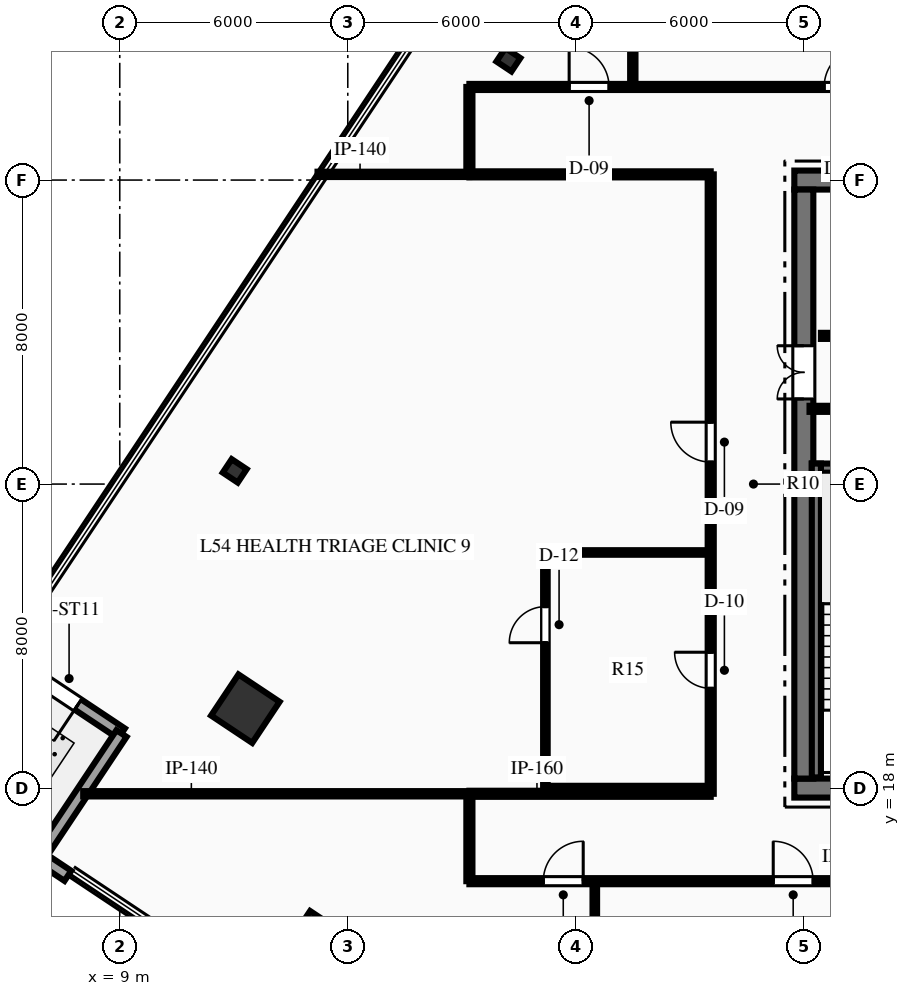
"""IFC4 building model, lengths in metres.
Left out: names, types, materials, properties, quantities, classifications, styles, units other than length and angle.
Written with IfcOpenShell. Run it as: python <this file> out.ifc"""

import sys

from ifc_helpers import new_model, si_unit, direction, frame, frame_2d, origin, origin_2d, place, context, subcontext, project, spatial, rectangle, hollow_rectangle, i_section, extrude, element, fill, save


model = new_model("IFC4")
c1 = context("Model", 3, precision=1e-05, world=origin(), true_north=direction((0.0, 1.0)))
c2 = subcontext(c1, "Body", "Model", "MODEL_VIEW")
j1 = project(units=[si_unit("LENGTHUNIT", "METRE"), si_unit("PLANEANGLEUNIT", "RADIAN")], contexts=[c1])
p1 = place(None, origin())
s1 = spatial("IfcSite", under=j1, at=p1, CompositionType="ELEMENT")
p2 = place(p1, origin())
s2 = spatial("IfcBuilding", under=s1, at=p2, CompositionType="ELEMENT")
p3 = place(p2, frame((0.0, 0.0, 217.2)))
s3 = spatial("IfcBuildingStorey", under=s2, at=p3, CompositionType="ELEMENT", Elevation=217.2)
p4 = place(p3, frame((26.75, 18.0, 0.0), z_axis=(0.0, 0.0, 1.0), x_axis=(1.0, 0.0, 0.0)))
e1 = element("IfcWall", 1, at=p4, inside=s3, PredefinedType="SHEAR", context=c2, shape_type="SweptSolid", body=[
    extrude(rectangle(XDim=18.5, YDim=0.5, at=frame_2d((9.25, 0.0))), origin(), (0.0, 0.0, 1.0), 3.75),
])
p5 = place(p4, frame((7.35, 0.0, 0.0)))
e2 = element("IfcOpeningElement", 2, at=p5, cuts=e1, PredefinedType="OPENING", context=c2, shape_type="SweptSolid", body=[
    extrude(rectangle(XDim=1.1, YDim=2.15, at=frame_2d((0.55, 1.075))), frame((0.0, 0.26, 0.0), z_axis=(0.0, -1.0, 0.0), x_axis=(1.0, 0.0, 0.0)), (0.0, 0.0, 1.0), 0.52),
])
p6 = place(p4, frame((10.05, 0.0, 0.0)))
e3 = element("IfcOpeningElement", 3, at=p6, cuts=e1, PredefinedType="OPENING", context=c2, shape_type="SweptSolid", body=[
    extrude(rectangle(XDim=1.1, YDim=2.15, at=frame_2d((0.55, 1.075))), frame((0.0, 0.26, 0.0), z_axis=(0.0, -1.0, 0.0), x_axis=(1.0, 0.0, 0.0)), (0.0, 0.0, 1.0), 0.52),
])
p7 = place(p3, frame((26.75, 34.0, 0.0), z_axis=(0.0, 0.0, 1.0), x_axis=(1.0, 0.0, 0.0)))
e4 = element("IfcWall", 4, at=p7, inside=s3, PredefinedType="SHEAR", context=c2, shape_type="SweptSolid", body=[
    extrude(rectangle(XDim=18.5, YDim=0.5, at=frame_2d((9.25, 0.0))), origin(), (0.0, 0.0, 1.0), 3.75),
])
p8 = place(p7, frame((13.935, 0.0, 0.0)))
e5 = element("IfcOpeningElement", 5, at=p8, cuts=e4, PredefinedType="OPENING", context=c2, shape_type="SweptSolid", body=[
    extrude(rectangle(XDim=1.1, YDim=2.15, at=frame_2d((0.55, 1.075))), frame((0.0, 0.26, 0.0), z_axis=(0.0, -1.0, 0.0), x_axis=(1.0, 0.0, 0.0)), (0.0, 0.0, 1.0), 0.52),
])
p9 = place(p7, frame((16.185, 0.0, 0.0)))
e6 = element("IfcOpeningElement", 6, at=p9, cuts=e4, PredefinedType="OPENING", context=c2, shape_type="SweptSolid", body=[
    extrude(rectangle(XDim=1.1, YDim=2.15, at=frame_2d((0.55, 1.075))), frame((0.0, 0.26, 0.0), z_axis=(0.0, -1.0, 0.0), x_axis=(1.0, 0.0, 0.0)), (0.0, 0.0, 1.0), 0.52),
])
p10 = place(p3, frame((27.0, 18.25, 0.0), z_axis=(0.0, 0.0, 1.0), x_axis=(0.0, 1.0, 0.0)))
e7 = element("IfcWall", 7, at=p10, inside=s3, PredefinedType="SHEAR", context=c2, shape_type="SweptSolid", body=[
    extrude(rectangle(XDim=15.5, YDim=0.5, at=frame_2d((7.75, 0.0))), origin(), (0.0, 0.0, 1.0), 3.75),
])
p11 = place(p10, frame((9.99, 0.0, 0.0)))
e8 = element("IfcOpeningElement", 8, at=p11, cuts=e7, PredefinedType="OPENING", context=c2, shape_type="SweptSolid", body=[
    extrude(rectangle(XDim=1.4, YDim=2.2, at=frame_2d((0.7, 1.1))), frame((0.0, 0.26, 0.0), z_axis=(0.0, -1.0, 0.0), x_axis=(1.0, 0.0, 0.0)), (0.0, 0.0, 1.0), 0.52),
])
p12 = place(p3, frame((27.21, 26.42, 0.0), z_axis=(0.0, 0.0, 1.0), x_axis=(1.0, 0.0, 0.0)))
e9 = element("IfcWall", 9, at=p12, inside=s3, PredefinedType="SHEAR", context=c2, shape_type="SweptSolid", body=[
    extrude(rectangle(XDim=3.98, YDim=0.24, at=frame_2d((1.99, 0.0))), origin(), (0.0, 0.0, 1.0), 3.75),
])
p13 = place(p3, frame((27.33, 18.28, 0.0), z_axis=(0.0, 0.0, 1.0), x_axis=(0.0, 1.0, 0.0)))
e10 = element("IfcWall", 10, at=p13, inside=s3, PredefinedType="SHEAR", context=c2, shape_type="SweptSolid", body=[
    extrude(rectangle(XDim=8.26, YDim=0.24, at=frame_2d((4.13, 0.0))), origin(), (0.0, 0.0, 1.0), 3.75),
])
p14 = place(p3, frame((12.305, 20.09, 0.0), z_axis=(0.0, 0.0, 1.0), x_axis=(0.554118199338, 0.832437998389, 0.0)))
e11 = element("IfcColumn", 11, at=p14, inside=s3, PredefinedType="COLUMN", context=c2, shape_type="SweptSolid", body=[
    extrude(hollow_rectangle(XDim=1.3, YDim=1.3, WallThickness=0.06, at=origin_2d()), origin(), (0.0, 0.0, 1.0), 3.75),
])
for number, where, z_axis, x_axis in (
    (12, (19.226, 37.166, 0.0), (0.0, 0.0, 1.0), (0.554, 0.832, 0.0)),
    (13, (12.025, 26.347, 0.0), (0.0, 0.0, 1.0), (0.554, 0.832, 0.0)),
    (14, (14.088, 14.458, 0.0), (0.0, 0.0, 1.0), (0.554, 0.832, 0.0)),
):
    element("IfcColumn", number, at=place(p3, frame(where, z_axis=z_axis, x_axis=x_axis)), inside=s3, PredefinedType="COLUMN", context=c2, shape_type="SweptSolid", body=[
        extrude(i_section(OverallWidth=0.424, OverallDepth=0.474, WebThickness=0.048, FlangeThickness=0.077, at=origin_2d()), origin(), (0.0, 0.0, 1.0), 3.75),
    ])
p15 = place(p3, frame((9.046, 19.436, 0.0), z_axis=(0.0, 0.0, 1.0), x_axis=(-0.832464190202, 0.554078850013, 0.0)))
e15 = element("IfcWall", 15, at=p15, inside=s3, PredefinedType="STANDARD", context=c2, shape_type="SweptSolid", body=[
    extrude(rectangle(XDim=3.9, YDim=0.32, at=frame_2d((1.95, 0.0))), origin(), (0.0, 0.0, 1.0), 3.47),
])
p16 = place(p15, frame((1.375, 0.0, 0.0)))
e16 = element("IfcOpeningElement", 16, at=p16, cuts=e15, PredefinedType="OPENING", context=c2, shape_type="SweptSolid", body=[
    extrude(rectangle(XDim=1.15, YDim=2.2, at=frame_2d((0.575, 1.1))), frame((0.0, 0.17, 0.0), z_axis=(0.0, -1.0, 0.0), x_axis=(1.0, 0.0, 0.0)), (0.0, 0.0, 1.0), 0.34),
])
p17 = place(p3, frame((6.885, 16.189, 0.0), z_axis=(0.0, 0.0, 1.0), x_axis=(0.554122229834, 0.832435315447, 0.0)))
e17 = element("IfcWall", 17, at=p17, inside=s3, PredefinedType="STANDARD", context=c2, shape_type="SweptSolid", body=[
    extrude(rectangle(XDim=3.9, YDim=0.32, at=frame_2d((1.95, 0.0))), origin(), (0.0, 0.0, 1.0), 3.47),
])
p18 = place(p3, frame((7.634, 15.69, 0.0), z_axis=(0.0, 0.0, 1.0), x_axis=(-0.832425662246, 0.554136731172, 0.0)))
e18 = element("IfcWall", 18, at=p18, inside=s3, PredefinedType="STANDARD", context=c2, shape_type="SweptSolid", body=[
    extrude(rectangle(XDim=0.9, YDim=0.32, at=frame_2d((0.45, 0.0))), origin(), (0.0, 0.0, 1.0), 3.47),
])
p19 = place(p3, frame((27.15, 27.98, 0.0), z_axis=(0.0, 0.0, 1.0), x_axis=(1.0, 0.0, 0.0)))
e19 = element("IfcWall", 19, at=p19, inside=s3, PredefinedType="PARTITIONING", context=c2, shape_type="SweptSolid", body=[
    extrude(rectangle(XDim=4.05, YDim=0.16, at=frame_2d((2.025, 0.0))), origin(), (0.0, 0.0, 1.0), 3.47),
])
p20 = place(p19, frame((1.625, 0.0, 0.0)))
e20 = element("IfcOpeningElement", 20, at=p20, cuts=e19, PredefinedType="OPENING", context=c2, shape_type="SweptSolid", body=[
    extrude(rectangle(XDim=0.95, YDim=2.15, at=frame_2d((0.475, 1.075))), frame((0.0, 0.09, 0.0), z_axis=(0.0, -1.0, 0.0), x_axis=(1.0, 0.0, 0.0)), (0.0, 0.0, 1.0), 0.18),
])
p21 = place(p3, frame((27.45, 29.9, 0.0), z_axis=(0.0, 0.0, 1.0), x_axis=(1.0, 0.0, 0.0)))
e21 = element("IfcWall", 21, at=p21, inside=s3, PredefinedType="PARTITIONING", context=c2, shape_type="SweptSolid", body=[
    extrude(rectangle(XDim=4.43, YDim=0.16, at=frame_2d((2.215, 0.0))), origin(), (0.0, 0.0, 1.0), 3.47),
])
p22 = place(p21, frame((1.675, 0.0, 0.0)))
e22 = element("IfcOpeningElement", 22, at=p22, cuts=e21, PredefinedType="OPENING", context=c2, shape_type="SweptSolid", body=[
    extrude(rectangle(XDim=0.95, YDim=2.15, at=frame_2d((0.475, 1.075))), frame((0.0, 0.09, 0.0), z_axis=(0.0, -1.0, 0.0), x_axis=(1.0, 0.0, 0.0)), (0.0, 0.0, 1.0), 0.18),
])
p23 = place(p3, frame((18.2, 15.55, 0.0), z_axis=(0.0, 0.0, 1.0), x_axis=(1.0, 0.0, 0.0)))
e23 = element("IfcWall", 23, at=p23, inside=s3, PredefinedType="PARTITIONING", context=c2, shape_type="SweptSolid", body=[
    extrude(rectangle(XDim=35.6, YDim=0.16, at=frame_2d((17.8, 0.0))), origin(), (0.0, 0.0, 1.0), 2.849),
])
p24 = place(p23, frame((22.45, 0.0, 0.0)))
e24 = element("IfcOpeningElement", 24, at=p24, cuts=e23, PredefinedType="OPENING", context=c2, shape_type="SweptSolid", body=[
    extrude(rectangle(XDim=0.9, YDim=2.15, at=frame_2d((0.45, 1.075))), frame((0.0, 0.09, 0.0), z_axis=(0.0, -1.0, 0.0), x_axis=(1.0, 0.0, 0.0)), (0.0, 0.0, 1.0), 0.18),
])
p25 = place(p23, frame((24.75, 0.0, 0.0)))
e25 = element("IfcOpeningElement", 25, at=p25, cuts=e23, PredefinedType="OPENING", context=c2, shape_type="SweptSolid", body=[
    extrude(rectangle(XDim=0.9, YDim=2.15, at=frame_2d((0.45, 1.075))), frame((0.0, 0.09, 0.0), z_axis=(0.0, -1.0, 0.0), x_axis=(1.0, 0.0, 0.0)), (0.0, 0.0, 1.0), 0.18),
])
p26 = place(p23, frame((27.0, 0.0, 0.0)))
e26 = element("IfcOpeningElement", 26, at=p26, cuts=e23, PredefinedType="OPENING", context=c2, shape_type="SweptSolid", body=[
    extrude(rectangle(XDim=1.0, YDim=2.15, at=frame_2d((0.5, 1.075))), frame((0.0, 0.09, 0.0), z_axis=(0.0, -1.0, 0.0), x_axis=(1.0, 0.0, 0.0)), (0.0, 0.0, 1.0), 0.18),
])
p27 = place(p23, frame((1.945, 0.0, 0.0)))
e27 = element("IfcOpeningElement", 27, at=p27, cuts=e23, PredefinedType="OPENING", context=c2, shape_type="SweptSolid", body=[
    extrude(rectangle(XDim=1.05, YDim=2.15, at=frame_2d((0.525, 1.075))), frame((0.0, 0.09, 0.0), z_axis=(0.0, -1.0, 0.0), x_axis=(1.0, 0.0, 0.0)), (0.0, 0.0, 1.0), 0.18),
])
p28 = place(p23, frame((7.995, 0.0, 0.0)))
e28 = element("IfcOpeningElement", 28, at=p28, cuts=e23, PredefinedType="OPENING", context=c2, shape_type="SweptSolid", body=[
    extrude(rectangle(XDim=1.05, YDim=2.15, at=frame_2d((0.525, 1.075))), frame((0.0, 0.09, 0.0), z_axis=(0.0, -1.0, 0.0), x_axis=(1.0, 0.0, 0.0)), (0.0, 0.0, 1.0), 0.18),
])
p29 = place(p23, frame((17.827, 0.0, 0.0)))
e29 = element("IfcOpeningElement", 29, at=p29, cuts=e23, PredefinedType="OPENING", context=c2, shape_type="SweptSolid", body=[
    extrude(rectangle(XDim=1.05, YDim=2.15, at=frame_2d((0.525, 1.075))), frame((0.0, 0.09, 0.0), z_axis=(0.0, -1.0, 0.0), x_axis=(1.0, 0.0, 0.0)), (0.0, 0.0, 1.0), 0.18),
])
p30 = place(p3, frame((18.2, 17.85, 0.0), z_axis=(0.0, 0.0, 1.0), x_axis=(1.0, 0.0, 0.0)))
e30 = element("IfcWall", 30, at=p30, inside=s3, PredefinedType="PARTITIONING", context=c2, shape_type="SweptSolid", body=[
    extrude(rectangle(XDim=6.35, YDim=0.16, at=frame_2d((3.175, 0.0))), origin(), (0.0, 0.0, 1.0), 3.47),
])
p31 = place(p3, frame((18.2, 36.45, 0.0), z_axis=(0.0, 0.0, 1.0), x_axis=(1.0, 0.0, 0.0)))
e31 = element("IfcWall", 31, at=p31, inside=s3, PredefinedType="PARTITIONING", context=c2, shape_type="SweptSolid", body=[
    extrude(rectangle(XDim=35.6, YDim=0.16, at=frame_2d((17.8, 0.0))), origin(), (0.0, 0.0, 1.0), 2.849),
])
p32 = place(p31, frame((2.625, 0.0, 0.0)))
e32 = element("IfcOpeningElement", 32, at=p32, cuts=e31, PredefinedType="OPENING", context=c2, shape_type="SweptSolid", body=[
    extrude(rectangle(XDim=1.05, YDim=2.15, at=frame_2d((0.525, 1.075))), frame((0.0, 0.09, 0.0), z_axis=(0.0, -1.0, 0.0), x_axis=(1.0, 0.0, 0.0)), (0.0, 0.0, 1.0), 0.18),
])
p33 = place(p31, frame((9.335, 0.0, 0.0)))
e33 = element("IfcOpeningElement", 33, at=p33, cuts=e31, PredefinedType="OPENING", context=c2, shape_type="SweptSolid", body=[
    extrude(rectangle(XDim=1.05, YDim=2.15, at=frame_2d((0.525, 1.075))), frame((0.0, 0.09, 0.0), z_axis=(0.0, -1.0, 0.0), x_axis=(1.0, 0.0, 0.0)), (0.0, 0.0, 1.0), 0.18),
])
p34 = place(p31, frame((17.125, 0.0, 0.0)))
e34 = element("IfcOpeningElement", 34, at=p34, cuts=e31, PredefinedType="OPENING", context=c2, shape_type="SweptSolid", body=[
    extrude(rectangle(XDim=1.05, YDim=2.15, at=frame_2d((0.525, 1.075))), frame((0.0, 0.09, 0.0), z_axis=(0.0, -1.0, 0.0), x_axis=(1.0, 0.0, 0.0)), (0.0, 0.0, 1.0), 0.18),
])
p35 = place(p31, frame((22.875, 0.0, 0.0)))
e35 = element("IfcOpeningElement", 35, at=p35, cuts=e31, PredefinedType="OPENING", context=c2, shape_type="SweptSolid", body=[
    extrude(rectangle(XDim=1.05, YDim=2.15, at=frame_2d((0.525, 1.075))), frame((0.0, 0.09, 0.0), z_axis=(0.0, -1.0, 0.0), x_axis=(1.0, 0.0, 0.0)), (0.0, 0.0, 1.0), 0.18),
])
p36 = place(p31, frame((31.759, 0.0, 0.0)))
e36 = element("IfcOpeningElement", 36, at=p36, cuts=e31, PredefinedType="OPENING", context=c2, shape_type="SweptSolid", body=[
    extrude(rectangle(XDim=1.05, YDim=2.15, at=frame_2d((0.525, 1.075))), frame((0.0, 0.09, 0.0), z_axis=(0.0, -1.0, 0.0), x_axis=(1.0, 0.0, 0.0)), (0.0, 0.0, 1.0), 0.18),
])
p37 = place(p3, frame((18.2, 34.15, 0.0), z_axis=(0.0, 0.0, 1.0), x_axis=(1.0, 0.0, 0.0)))
e37 = element("IfcWall", 37, at=p37, inside=s3, PredefinedType="PARTITIONING", context=c2, shape_type="SweptSolid", body=[
    extrude(rectangle(XDim=6.35, YDim=0.16, at=frame_2d((3.175, 0.0))), origin(), (0.0, 0.0, 1.0), 3.47),
])
p38 = place(p3, frame((24.55, 17.85, 0.0), z_axis=(0.0, 0.0, 1.0), x_axis=(0.0, 1.0, 0.0)))
e38 = element("IfcWall", 38, at=p38, inside=s3, PredefinedType="PARTITIONING", context=c2, shape_type="SweptSolid", body=[
    extrude(rectangle(XDim=16.3, YDim=0.16, at=frame_2d((8.15, 0.0))), origin(), (0.0, 0.0, 1.0), 3.47),
])
p39 = place(p38, frame((2.775, 0.0, 0.0)))
e39 = element("IfcOpeningElement", 39, at=p39, cuts=e38, PredefinedType="OPENING", context=c2, shape_type="SweptSolid", body=[
    extrude(rectangle(XDim=0.95, YDim=2.15, at=frame_2d((0.475, 1.075))), frame((0.0, 0.09, 0.0), z_axis=(0.0, -1.0, 0.0), x_axis=(1.0, 0.0, 0.0)), (0.0, 0.0, 1.0), 0.18),
])
p40 = place(p38, frame((8.729, 0.0, 0.0)))
e40 = element("IfcOpeningElement", 40, at=p40, cuts=e38, PredefinedType="OPENING", context=c2, shape_type="SweptSolid", body=[
    extrude(rectangle(XDim=1.05, YDim=2.15, at=frame_2d((0.525, 1.075))), frame((0.0, 0.09, 0.0), z_axis=(0.0, -1.0, 0.0), x_axis=(1.0, 0.0, 0.0)), (0.0, 0.0, 1.0), 0.18),
])
for number, where, z_axis, x_axis in (
    (41, (18.2, 15.55, 0.0), (0.0, 0.0, 1.0), (0.0, 1.0, 0.0)),
    (42, (18.2, 34.15, 0.0), (0.0, 0.0, 1.0), (0.0, 1.0, 0.0)),
):
    element("IfcWall", number, at=place(p3, frame(where, z_axis=z_axis, x_axis=x_axis)), inside=s3, PredefinedType="PARTITIONING", context=c2, shape_type="SweptSolid", body=[
        extrude(rectangle(XDim=2.3, YDim=0.16, at=frame_2d((1.15, 0.0))), origin(), (0.0, 0.0, 1.0), 3.47),
    ])
p41 = place(p3, frame((8.039, 17.85, 0.0), z_axis=(0.0, 0.0, 1.0), x_axis=(1.0, 0.0, 0.0)))
e43 = element("IfcWall", 43, at=p41, inside=s3, PredefinedType="PARTITIONING", context=c2, shape_type="SweptSolid", body=[
    extrude(rectangle(XDim=10.161, YDim=0.14, at=frame_2d((5.081, 0.0))), origin(), (0.0, 0.0, 1.0), 3.47),
])
p42 = place(p3, frame((14.204, 34.15, 0.0), z_axis=(0.0, 0.0, 1.0), x_axis=(1.0, 0.0, 0.0)))
e44 = element("IfcWall", 44, at=p42, inside=s3, PredefinedType="PARTITIONING", context=c2, shape_type="SweptSolid", body=[
    extrude(rectangle(XDim=3.996, YDim=0.14, at=frame_2d((1.998, 0.0))), origin(), (0.0, 0.0, 1.0), 3.47),
])
p43 = place(p3, frame((21.5, 6.509, 0.0), z_axis=(0.0, 0.0, 1.0), x_axis=(0.0, 1.0, 0.0)))
e45 = element("IfcWall", 45, at=p43, inside=s3, PredefinedType="PARTITIONING", context=c2, shape_type="SweptSolid", body=[
    extrude(rectangle(XDim=9.041, YDim=0.12, at=frame_2d((4.521, 0.0))), origin(), (0.0, 0.0, 1.0), 3.47),
])
p44 = place(p3, frame((22.5, 36.45, 0.0), z_axis=(0.0, 0.0, 1.0), x_axis=(0.0, 1.0, 0.0)))
e46 = element("IfcWall", 46, at=p44, inside=s3, PredefinedType="PARTITIONING", context=c2, shape_type="SweptSolid", body=[
    extrude(rectangle(XDim=10.163, YDim=0.14, at=frame_2d((5.082, 0.0))), origin(), (0.0, 0.0, 1.0), 3.47),
])
p45 = place(p3, frame((20.2, 18.0, 0.0), z_axis=(0.0, 0.0, 1.0), x_axis=(1.0, 0.0, 0.0)))
e47 = element("IfcWall", 47, at=p45, inside=s3, PredefinedType="PARTITIONING", context=c2, shape_type="SweptSolid", body=[
    extrude(rectangle(XDim=4.35, YDim=0.12, at=frame_2d((2.175, 0.0))), origin(), (0.0, 0.0, 1.0), 3.47),
])
p46 = place(p3, frame((20.2, 18.0, 0.0), z_axis=(0.0, 0.0, 1.0), x_axis=(0.0, 1.0, 0.0)))
e48 = element("IfcWall", 48, at=p46, inside=s3, PredefinedType="PARTITIONING", context=c2, shape_type="SweptSolid", body=[
    extrude(rectangle(XDim=6.2, YDim=0.12, at=frame_2d((3.1, 0.0))), origin(), (0.0, 0.0, 1.0), 3.47),
])
p47 = place(p46, frame((3.825, 0.0, 0.0)))
e49 = element("IfcOpeningElement", 49, at=p47, cuts=e48, PredefinedType="OPENING", context=c2, shape_type="SweptSolid", body=[
    extrude(rectangle(XDim=0.95, YDim=2.15, at=frame_2d((0.475, 1.075))), frame((0.0, 0.07, 0.0), z_axis=(0.0, -1.0, 0.0), x_axis=(1.0, 0.0, 0.0)), (0.0, 0.0, 1.0), 0.14),
])
p48 = place(p3, frame((20.2, 24.2, 0.0), z_axis=(0.0, 0.0, 1.0), x_axis=(1.0, 0.0, 0.0)))
e50 = element("IfcWall", 50, at=p48, inside=s3, PredefinedType="PARTITIONING", context=c2, shape_type="SweptSolid", body=[
    extrude(rectangle(XDim=4.35, YDim=0.12, at=frame_2d((2.175, 0.0))), origin(), (0.0, 0.0, 1.0), 3.47),
])
p49 = place(p16, origin())
e51 = element("IfcDoor", 51, at=p49, inside=s3, OperationType="SINGLE_SWING_LEFT", PredefinedType="DOOR", context=c2, shape_type="SweptSolid", body=[
    extrude(rectangle(XDim=1.15, YDim=2.2, at=frame_2d((0.575, 1.1))), frame((0.0, 0.025, 0.0), z_axis=(0.0, -1.0, 0.0), x_axis=(1.0, 0.0, 0.0)), (0.0, 0.0, 1.0), 0.05),
])
fill(e16, e51)
p50 = place(p11, origin())
e52 = element("IfcDoor", 52, at=p50, inside=s3, OperationType="DOUBLE_DOOR_SINGLE_SWING", PredefinedType="DOOR", context=c2, shape_type="SweptSolid", body=[
    extrude(rectangle(XDim=1.4, YDim=2.2, at=frame_2d((0.7, 1.1))), frame((0.0, 0.025, 0.0), z_axis=(0.0, -1.0, 0.0), x_axis=(1.0, 0.0, 0.0)), (0.0, 0.0, 1.0), 0.05),
])
fill(e8, e52)
p51 = place(p39, origin())
e53 = element("IfcDoor", 53, at=p51, inside=s3, OperationType="SINGLE_SWING_RIGHT", PredefinedType="DOOR", context=c2, shape_type="SweptSolid", body=[
    extrude(rectangle(XDim=0.95, YDim=2.15, at=frame_2d((0.475, 1.075))), frame((0.0, 0.025, 0.0), z_axis=(0.0, -1.0, 0.0), x_axis=(1.0, 0.0, 0.0)), (0.0, 0.0, 1.0), 0.05),
])
fill(e39, e53)
p52 = place(p47, origin())
e54 = element("IfcDoor", 54, at=p52, inside=s3, OperationType="SINGLE_SWING_LEFT", PredefinedType="DOOR", context=c2, shape_type="SweptSolid", body=[
    extrude(rectangle(XDim=0.95, YDim=2.15, at=frame_2d((0.475, 1.075))), frame((0.0, 0.025, 0.0), z_axis=(0.0, -1.0, 0.0), x_axis=(1.0, 0.0, 0.0)), (0.0, 0.0, 1.0), 0.05),
])
fill(e49, e54)
p53 = place(p27, origin())
e55 = element("IfcDoor", 55, at=p53, inside=s3, OperationType="SINGLE_SWING_RIGHT", PredefinedType="DOOR", context=c2, shape_type="SweptSolid", body=[
    extrude(rectangle(XDim=1.05, YDim=2.15, at=frame_2d((0.525, 1.075))), frame((0.0, 0.025, 0.0), z_axis=(0.0, -1.0, 0.0), x_axis=(1.0, 0.0, 0.0)), (0.0, 0.0, 1.0), 0.05),
])
fill(e27, e55)
p54 = place(p28, origin())
e56 = element("IfcDoor", 56, at=p54, inside=s3, OperationType="SINGLE_SWING_LEFT", PredefinedType="DOOR", context=c2, shape_type="SweptSolid", body=[
    extrude(rectangle(XDim=1.05, YDim=2.15, at=frame_2d((0.525, 1.075))), frame((0.0, 0.025, 0.0), z_axis=(0.0, -1.0, 0.0), x_axis=(1.0, 0.0, 0.0)), (0.0, 0.0, 1.0), 0.05),
])
fill(e28, e56)
p55 = place(p32, origin())
e57 = element("IfcDoor", 57, at=p55, inside=s3, OperationType="SINGLE_SWING_LEFT", PredefinedType="DOOR", context=c2, shape_type="SweptSolid", body=[
    extrude(rectangle(XDim=1.05, YDim=2.15, at=frame_2d((0.525, 1.075))), frame((0.0, 0.025, 0.0), z_axis=(0.0, -1.0, 0.0), x_axis=(1.0, 0.0, 0.0)), (0.0, 0.0, 1.0), 0.05),
])
fill(e32, e57)
p56 = place(p33, origin())
e58 = element("IfcDoor", 58, at=p56, inside=s3, OperationType="SINGLE_SWING_RIGHT", PredefinedType="DOOR", context=c2, shape_type="SweptSolid", body=[
    extrude(rectangle(XDim=1.05, YDim=2.15, at=frame_2d((0.525, 1.075))), frame((0.0, 0.025, 0.0), z_axis=(0.0, -1.0, 0.0), x_axis=(1.0, 0.0, 0.0)), (0.0, 0.0, 1.0), 0.05),
])
fill(e33, e58)
p57 = place(p40, origin())
e59 = element("IfcDoor", 59, at=p57, inside=s3, OperationType="SINGLE_SWING_RIGHT", PredefinedType="DOOR", context=c2, shape_type="SweptSolid", body=[
    extrude(rectangle(XDim=1.05, YDim=2.15, at=frame_2d((0.525, 1.075))), frame((0.0, 0.025, 0.0), z_axis=(0.0, -1.0, 0.0), x_axis=(1.0, 0.0, 0.0)), (0.0, 0.0, 1.0), 0.05),
])
fill(e40, e59)
save(model, sys.argv[1])
